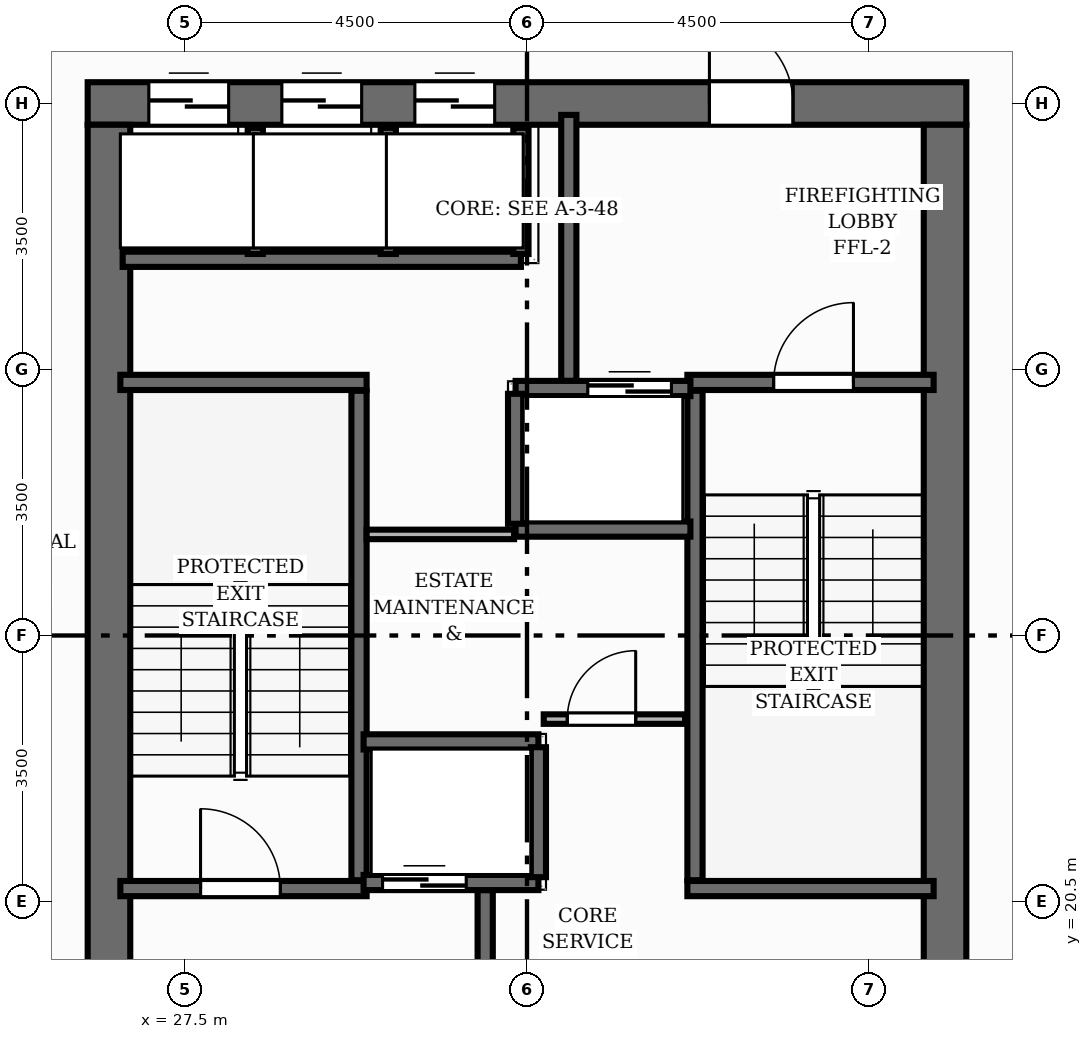
"""IFC4 building model, lengths in metres.
Left out: names, types, materials, properties, quantities, classifications, styles, units other than length and angle.
Written with IfcOpenShell. Run it as: python <this file> out.ifc"""

import sys

from ifc_helpers import new_model, si_unit, direction, frame, frame_2d, origin, place, context, subcontext, project, spatial, rectangle, extrude, element, fill, save


model = new_model("IFC4")
c1 = context("Model", 3, precision=1e-05, world=origin(), true_north=direction((0.0, 1.0)))
c2 = subcontext(c1, "Body", "Model", "MODEL_VIEW")
j1 = project(units=[si_unit("LENGTHUNIT", "METRE"), si_unit("PLANEANGLEUNIT", "RADIAN")], contexts=[c1])
p1 = place(None, origin())
s1 = spatial("IfcSite", under=j1, at=p1, CompositionType="ELEMENT")
p2 = place(p1, origin())
s2 = spatial("IfcBuilding", under=s1, at=p2, CompositionType="ELEMENT")
p3 = place(p2, frame((0.0, 0.0, 201.44)))
s3 = spatial("IfcBuildingStorey", under=s2, at=p3, CompositionType="ELEMENT", Elevation=201.44)
p4 = place(p3, frame((26.22, 31.0, 0.0), z_axis=(0.0, 0.0, 1.0), x_axis=(1.0, 0.0, 0.0)))
e1 = element("IfcWall", 1, at=p4, inside=s3, PredefinedType="SHEAR", context=c2, shape_type="SweptSolid", body=[
    extrude(rectangle(XDim=11.56, YDim=0.56, at=frame_2d((5.78, 0.0))), origin(), (0.0, 0.0, 1.0), 3.2),
])
p5 = place(p4, frame((8.18, 0.0, 0.0)))
e2 = element("IfcOpeningElement", 2, at=p5, cuts=e1, PredefinedType="OPENING", context=c2, shape_type="SweptSolid", body=[
    extrude(rectangle(XDim=1.1, YDim=2.15, at=frame_2d((0.55, 1.075))), frame((0.0, 0.29, 0.0), z_axis=(0.0, -1.0, 0.0), x_axis=(1.0, 0.0, 0.0)), (0.0, 0.0, 1.0), 0.58),
])
p6 = place(p4, frame((0.805, 0.0, 0.0)))
e3 = element("IfcOpeningElement", 3, at=p6, cuts=e1, PredefinedType="OPENING", context=c2, shape_type="SweptSolid", body=[
    extrude(rectangle(XDim=1.05, YDim=2.15, at=frame_2d((0.525, 1.075))), frame((0.0, 0.29, 0.0), z_axis=(0.0, -1.0, 0.0), x_axis=(1.0, 0.0, 0.0)), (0.0, 0.0, 1.0), 0.58),
])
p7 = place(p4, frame((2.555, 0.0, 0.0)))
e4 = element("IfcOpeningElement", 4, at=p7, cuts=e1, PredefinedType="OPENING", context=c2, shape_type="SweptSolid", body=[
    extrude(rectangle(XDim=1.05, YDim=2.15, at=frame_2d((0.525, 1.075))), frame((0.0, 0.29, 0.0), z_axis=(0.0, -1.0, 0.0), x_axis=(1.0, 0.0, 0.0)), (0.0, 0.0, 1.0), 0.58),
])
p8 = place(p4, frame((4.305, 0.0, 0.0)))
e5 = element("IfcOpeningElement", 5, at=p8, cuts=e1, PredefinedType="OPENING", context=c2, shape_type="SweptSolid", body=[
    extrude(rectangle(XDim=1.05, YDim=2.15, at=frame_2d((0.525, 1.075))), frame((0.0, 0.29, 0.0), z_axis=(0.0, -1.0, 0.0), x_axis=(1.0, 0.0, 0.0)), (0.0, 0.0, 1.0), 0.58),
])
for number, where, z_axis, x_axis in (
    (6, (26.5, 17.28, 0.0), (0.0, 0.0, 1.0), (0.0, 1.0, 0.0)),
    (7, (37.5, 17.28, 0.0), (0.0, 0.0, 1.0), (0.0, 1.0, 0.0)),
):
    element("IfcWall", number, at=place(p3, frame(where, z_axis=z_axis, x_axis=x_axis)), inside=s3, PredefinedType="SHEAR", context=c2, shape_type="SweptSolid", body=[
        extrude(rectangle(XDim=13.44, YDim=0.56, at=frame_2d((6.72, 0.0))), origin(), (0.0, 0.0, 1.0), 3.2),
    ])
p9 = place(p3, frame((29.79, 20.78, 0.0), z_axis=(0.0, 0.0, 1.0), x_axis=(0.0, 1.0, 0.0)))
e8 = element("IfcWall", 8, at=p9, inside=s3, PredefinedType="SHEAR", context=c2, shape_type="SweptSolid", body=[
    extrude(rectangle(XDim=6.44, YDim=0.2, at=frame_2d((3.22, 0.0))), origin(), (0.0, 0.0, 1.0), 3.2),
])
p10 = place(p3, frame((26.65, 27.33, 0.0), z_axis=(0.0, 0.0, 1.0), x_axis=(1.0, 0.0, 0.0)))
e9 = element("IfcWall", 9, at=p10, inside=s3, PredefinedType="SHEAR", context=c2, shape_type="SweptSolid", body=[
    extrude(rectangle(XDim=3.24, YDim=0.2, at=frame_2d((1.62, 0.0))), origin(), (0.0, 0.0, 1.0), 3.2),
])
p11 = place(p3, frame((26.65, 20.67, 0.0), z_axis=(0.0, 0.0, 1.0), x_axis=(1.0, 0.0, 0.0)))
e10 = element("IfcWall", 10, at=p11, inside=s3, PredefinedType="SHEAR", context=c2, shape_type="SweptSolid", body=[
    extrude(rectangle(XDim=3.24, YDim=0.2, at=frame_2d((1.62, 0.0))), origin(), (0.0, 0.0, 1.0), 3.2),
])
p12 = place(p11, frame((1.055, 0.0, 0.0)))
e11 = element("IfcOpeningElement", 11, at=p12, cuts=e10, PredefinedType="OPENING", context=c2, shape_type="SweptSolid", body=[
    extrude(rectangle(XDim=1.05, YDim=2.15, at=frame_2d((0.525, 1.075))), frame((0.0, 0.11, 0.0), z_axis=(0.0, -1.0, 0.0), x_axis=(1.0, 0.0, 0.0)), (0.0, 0.0, 1.0), 0.22),
])
p13 = place(p3, frame((34.21, 20.78, 0.0), z_axis=(0.0, 0.0, 1.0), x_axis=(0.0, 1.0, 0.0)))
e12 = element("IfcWall", 12, at=p13, inside=s3, PredefinedType="SHEAR", context=c2, shape_type="SweptSolid", body=[
    extrude(rectangle(XDim=6.44, YDim=0.2, at=frame_2d((3.22, 0.0))), origin(), (0.0, 0.0, 1.0), 3.2),
])
p14 = place(p3, frame((34.11, 20.67, 0.0), z_axis=(0.0, 0.0, 1.0), x_axis=(1.0, 0.0, 0.0)))
e13 = element("IfcWall", 13, at=p14, inside=s3, PredefinedType="SHEAR", context=c2, shape_type="SweptSolid", body=[
    extrude(rectangle(XDim=3.24, YDim=0.2, at=frame_2d((1.62, 0.0))), origin(), (0.0, 0.0, 1.0), 3.2),
])
p15 = place(p3, frame((34.11, 27.33, 0.0), z_axis=(0.0, 0.0, 1.0), x_axis=(1.0, 0.0, 0.0)))
e14 = element("IfcWall", 14, at=p15, inside=s3, PredefinedType="SHEAR", context=c2, shape_type="SweptSolid", body=[
    extrude(rectangle(XDim=3.24, YDim=0.2, at=frame_2d((1.62, 0.0))), origin(), (0.0, 0.0, 1.0), 3.2),
])
p16 = place(p15, frame((1.135, 0.0, 0.0)))
e15 = element("IfcOpeningElement", 15, at=p16, cuts=e14, PredefinedType="OPENING", context=c2, shape_type="SweptSolid", body=[
    extrude(rectangle(XDim=1.05, YDim=2.15, at=frame_2d((0.525, 1.075))), frame((0.0, 0.11, 0.0), z_axis=(0.0, -1.0, 0.0), x_axis=(1.0, 0.0, 0.0)), (0.0, 0.0, 1.0), 0.22),
])
for number, where, z_axis, x_axis in (
    (16, (31.45, 17.15, 0.0), (0.0, 0.0, 1.0), (0.0, 1.0, 0.0)),
    (17, (32.55, 27.35, 0.0), (0.0, 0.0, 1.0), (0.0, 1.0, 0.0)),
):
    element("IfcWall", number, at=place(p3, frame(where, z_axis=z_axis, x_axis=x_axis)), inside=s3, PredefinedType="SHEAR", context=c2, shape_type="SweptSolid", body=[
        extrude(rectangle(XDim=3.5, YDim=0.2, at=frame_2d((1.75, 0.0))), origin(), (0.0, 0.0, 1.0), 3.2),
    ])
p17 = place(p3, frame((29.85, 20.75, 0.0), z_axis=(0.0, 0.0, 1.0), x_axis=(1.0, 0.0, 0.0)))
e18 = element("IfcWall", 18, at=p17, inside=s3, PredefinedType="SHEAR", context=c2, shape_type="SweptSolid", body=[
    extrude(rectangle(XDim=2.3, YDim=0.2, at=frame_2d((1.15, 0.0))), origin(), (0.0, 0.0, 1.0), 3.2),
])
p18 = place(p17, frame((0.25, 0.0, 0.0)))
e19 = element("IfcOpeningElement", 19, at=p18, cuts=e18, PredefinedType="OPENING", context=c2, shape_type="SweptSolid", body=[
    extrude(rectangle(XDim=1.1, YDim=2.15, at=frame_2d((0.55, 1.075))), frame((0.0, 0.11, 0.0), z_axis=(0.0, -1.0, 0.0), x_axis=(1.0, 0.0, 0.0)), (0.0, 0.0, 1.0), 0.22),
])
p19 = place(p3, frame((29.85, 22.6, 0.0), z_axis=(0.0, 0.0, 1.0), x_axis=(1.0, 0.0, 0.0)))
e20 = element("IfcWall", 20, at=p19, inside=s3, PredefinedType="SHEAR", context=c2, shape_type="SweptSolid", body=[
    extrude(rectangle(XDim=2.3, YDim=0.2, at=frame_2d((1.15, 0.0))), origin(), (0.0, 0.0, 1.0), 3.2),
])
p20 = place(p3, frame((32.15, 20.82, 0.0), z_axis=(0.0, 0.0, 1.0), x_axis=(0.0, 1.0, 0.0)))
e21 = element("IfcWall", 21, at=p20, inside=s3, PredefinedType="SHEAR", context=c2, shape_type="SweptSolid", body=[
    extrude(rectangle(XDim=1.71, YDim=0.2, at=frame_2d((0.855, 0.0))), origin(), (0.0, 0.0, 1.0), 3.2),
])
p21 = place(p3, frame((31.85, 27.25, 0.0), z_axis=(0.0, 0.0, 1.0), x_axis=(1.0, 0.0, 0.0)))
e22 = element("IfcWall", 22, at=p21, inside=s3, PredefinedType="SHEAR", context=c2, shape_type="SweptSolid", body=[
    extrude(rectangle(XDim=2.3, YDim=0.2, at=frame_2d((1.15, 0.0))), origin(), (0.0, 0.0, 1.0), 3.2),
])
p22 = place(p21, frame((0.95, 0.0, 0.0)))
e23 = element("IfcOpeningElement", 23, at=p22, cuts=e22, PredefinedType="OPENING", context=c2, shape_type="SweptSolid", body=[
    extrude(rectangle(XDim=1.1, YDim=2.15, at=frame_2d((0.55, 1.075))), frame((0.0, 0.11, 0.0), z_axis=(0.0, -1.0, 0.0), x_axis=(1.0, 0.0, 0.0)), (0.0, 0.0, 1.0), 0.22),
])
p23 = place(p3, frame((31.85, 25.4, 0.0), z_axis=(0.0, 0.0, 1.0), x_axis=(1.0, 0.0, 0.0)))
e24 = element("IfcWall", 24, at=p23, inside=s3, PredefinedType="SHEAR", context=c2, shape_type="SweptSolid", body=[
    extrude(rectangle(XDim=2.3, YDim=0.2, at=frame_2d((1.15, 0.0))), origin(), (0.0, 0.0, 1.0), 3.2),
])
p24 = place(p3, frame((31.85, 25.47, 0.0), z_axis=(0.0, 0.0, 1.0), x_axis=(0.0, 1.0, 0.0)))
e25 = element("IfcWall", 25, at=p24, inside=s3, PredefinedType="SHEAR", context=c2, shape_type="SweptSolid", body=[
    extrude(rectangle(XDim=1.71, YDim=0.2, at=frame_2d((0.855, 0.0))), origin(), (0.0, 0.0, 1.0), 3.2),
])
p25 = place(p3, frame((26.68, 28.95, 0.0), z_axis=(0.0, 0.0, 1.0), x_axis=(1.0, 0.0, 0.0)))
e26 = element("IfcWall", 26, at=p25, inside=s3, PredefinedType="SHEAR", context=c2, shape_type="SweptSolid", body=[
    extrude(rectangle(XDim=5.24, YDim=0.2, at=frame_2d((2.62, 0.0))), origin(), (0.0, 0.0, 1.0), 3.2),
])
for number, where, z_axis, x_axis in (
    (27, (31.92, 29.02, 0.0), (0.0, 0.0, 1.0), (0.0, 1.0, 0.0)),
    (28, (28.425, 29.02, 0.0), (0.0, 0.0, 1.0), (0.0, 1.0, 0.0)),
    (29, (30.175, 29.02, 0.0), (0.0, 0.0, 1.0), (0.0, 1.0, 0.0)),
):
    element("IfcWall", number, at=place(p3, frame(where, z_axis=z_axis, x_axis=x_axis)), inside=s3, PredefinedType="SHEAR", context=c2, shape_type="SweptSolid", body=[
        extrude(rectangle(XDim=1.66, YDim=0.2, at=frame_2d((0.83, 0.0))), origin(), (0.0, 0.0, 1.0), 3.2),
    ])
p26 = place(p3, frame((32.22, 22.9, 0.0), z_axis=(0.0, 0.0, 1.0), x_axis=(1.0, 0.0, 0.0)))
e30 = element("IfcWall", 30, at=p26, inside=s3, PredefinedType="PARTITIONING", context=c2, shape_type="SweptSolid", body=[
    extrude(rectangle(XDim=1.86, YDim=0.125, at=frame_2d((0.93, 0.0))), origin(), (0.0, 0.0, 1.0), 2.955),
])
p27 = place(p26, frame((0.31, 0.0, 0.0)))
e31 = element("IfcOpeningElement", 31, at=p27, cuts=e30, PredefinedType="OPENING", context=c2, shape_type="SweptSolid", body=[
    extrude(rectangle(XDim=0.9, YDim=2.1, at=frame_2d((0.45, 1.05))), frame((0.0, 0.073, 0.0), z_axis=(0.0, -1.0, 0.0), x_axis=(1.0, 0.0, 0.0)), (0.0, 0.0, 1.0), 0.145),
])
p28 = place(p3, frame((29.89, 25.33, 0.0), z_axis=(0.0, 0.0, 1.0), x_axis=(1.0, 0.0, 0.0)))
e32 = element("IfcWall", 32, at=p28, inside=s3, PredefinedType="PARTITIONING", context=c2, shape_type="SweptSolid", body=[
    extrude(rectangle(XDim=1.94, YDim=0.125, at=frame_2d((0.97, 0.0))), origin(), (0.0, 0.0, 1.0), 2.955),
])
p29 = place(p12, origin())
e33 = element("IfcDoor", 33, at=p29, inside=s3, OperationType="SINGLE_SWING_LEFT", PredefinedType="DOOR", context=c2, shape_type="SweptSolid", body=[
    extrude(rectangle(XDim=1.05, YDim=2.15, at=frame_2d((0.525, 1.075))), frame((0.0, 0.025, 0.0), z_axis=(0.0, -1.0, 0.0), x_axis=(1.0, 0.0, 0.0)), (0.0, 0.0, 1.0), 0.05),
])
fill(e11, e33)
p30 = place(p16, origin())
e34 = element("IfcDoor", 34, at=p30, inside=s3, OperationType="SINGLE_SWING_RIGHT", PredefinedType="DOOR", context=c2, shape_type="SweptSolid", body=[
    extrude(rectangle(XDim=1.05, YDim=2.15, at=frame_2d((0.525, 1.075))), frame((0.0, 0.025, 0.0), z_axis=(0.0, -1.0, 0.0), x_axis=(1.0, 0.0, 0.0)), (0.0, 0.0, 1.0), 0.05),
])
fill(e15, e34)
p31 = place(p5, origin())
e35 = element("IfcDoor", 35, at=p31, inside=s3, OperationType="SINGLE_SWING_LEFT", PredefinedType="DOOR", context=c2, shape_type="SweptSolid", body=[
    extrude(rectangle(XDim=1.1, YDim=2.15, at=frame_2d((0.55, 1.075))), frame((0.0, 0.025, 0.0), z_axis=(0.0, -1.0, 0.0), x_axis=(1.0, 0.0, 0.0)), (0.0, 0.0, 1.0), 0.05),
])
fill(e2, e35)
p32 = place(p18, origin())
e36 = element("IfcDoor", 36, at=p32, inside=s3, OperationType="DOUBLE_DOOR_SLIDING", PredefinedType="DOOR", context=c2, shape_type="SweptSolid", body=[
    extrude(rectangle(XDim=1.1, YDim=2.15, at=frame_2d((0.55, 1.075))), frame((0.0, 0.025, 0.0), z_axis=(0.0, -1.0, 0.0), x_axis=(1.0, 0.0, 0.0)), (0.0, 0.0, 1.0), 0.05),
])
fill(e19, e36)
p33 = place(p22, origin())
e37 = element("IfcDoor", 37, at=p33, inside=s3, OperationType="DOUBLE_DOOR_SLIDING", PredefinedType="DOOR", context=c2, shape_type="SweptSolid", body=[
    extrude(rectangle(XDim=1.1, YDim=2.15, at=frame_2d((0.55, 1.075))), frame((0.0, 0.025, 0.0), z_axis=(0.0, -1.0, 0.0), x_axis=(1.0, 0.0, 0.0)), (0.0, 0.0, 1.0), 0.05),
])
fill(e23, e37)
p34 = place(p6, origin())
e38 = element("IfcDoor", 38, at=p34, inside=s3, OperationType="DOUBLE_DOOR_SLIDING", PredefinedType="DOOR", context=c2, shape_type="SweptSolid", body=[
    extrude(rectangle(XDim=1.05, YDim=2.15, at=frame_2d((0.525, 1.075))), frame((0.0, 0.025, 0.0), z_axis=(0.0, -1.0, 0.0), x_axis=(1.0, 0.0, 0.0)), (0.0, 0.0, 1.0), 0.05),
])
fill(e3, e38)
p35 = place(p7, origin())
e39 = element("IfcDoor", 39, at=p35, inside=s3, OperationType="DOUBLE_DOOR_SLIDING", PredefinedType="DOOR", context=c2, shape_type="SweptSolid", body=[
    extrude(rectangle(XDim=1.05, YDim=2.15, at=frame_2d((0.525, 1.075))), frame((0.0, 0.025, 0.0), z_axis=(0.0, -1.0, 0.0), x_axis=(1.0, 0.0, 0.0)), (0.0, 0.0, 1.0), 0.05),
])
fill(e4, e39)
p36 = place(p8, origin())
e40 = element("IfcDoor", 40, at=p36, inside=s3, OperationType="DOUBLE_DOOR_SLIDING", PredefinedType="DOOR", context=c2, shape_type="SweptSolid", body=[
    extrude(rectangle(XDim=1.05, YDim=2.15, at=frame_2d((0.525, 1.075))), frame((0.0, 0.025, 0.0), z_axis=(0.0, -1.0, 0.0), x_axis=(1.0, 0.0, 0.0)), (0.0, 0.0, 1.0), 0.05),
])
fill(e5, e40)
p37 = place(p27, origin())
e41 = element("IfcDoor", 41, at=p37, inside=s3, OperationType="SINGLE_SWING_RIGHT", PredefinedType="DOOR", context=c2, shape_type="SweptSolid", body=[
    extrude(rectangle(XDim=0.9, YDim=2.1, at=frame_2d((0.45, 1.05))), frame((0.0, 0.025, 0.0), z_axis=(0.0, -1.0, 0.0), x_axis=(1.0, 0.0, 0.0)), (0.0, 0.0, 1.0), 0.05),
])
fill(e31, e41)
save(model, sys.argv[1])
